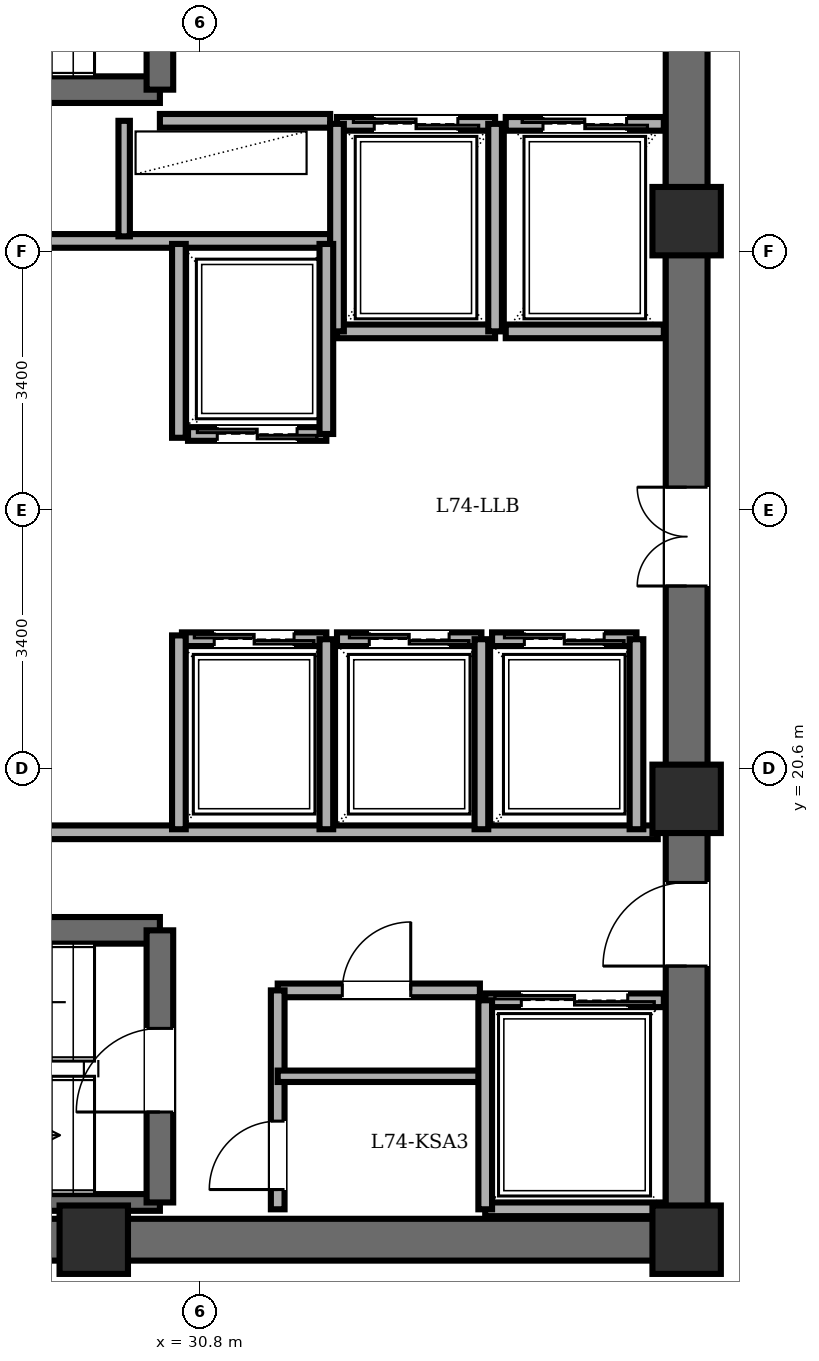
"""IFC4 building model, lengths in metres.
Left out: names, types, materials, properties, quantities, classifications, styles, units other than length and angle.
Written with IfcOpenShell. Run it as: python <this file> out.ifc"""

import sys

from ifc_helpers import new_model, si_unit, direction, frame, frame_2d, origin, origin_2d, place, context, subcontext, project, spatial, rectangle, extrude, element, fill, save


model = new_model("IFC4")
c1 = context("Model", 3, precision=1e-05, world=origin(), true_north=direction((0.0, 1.0)))
c2 = subcontext(c1, "Body", "Model", "MODEL_VIEW")
j1 = project(units=[si_unit("LENGTHUNIT", "METRE"), si_unit("PLANEANGLEUNIT", "RADIAN")], contexts=[c1])
p1 = place(None, origin())
s1 = spatial("IfcSite", under=j1, at=p1, CompositionType="ELEMENT")
p2 = place(p1, origin())
s2 = spatial("IfcBuilding", under=s1, at=p2, CompositionType="ELEMENT")
p3 = place(p2, frame((0.0, 0.0, 284.35)))
s3 = spatial("IfcBuildingStorey", under=s2, at=p3, CompositionType="ELEMENT", Elevation=284.35)
for number, where, z_axis, x_axis in (
    (1, (29.4, 14.4, 0.0), (0.0, 0.0, 1.0), (1.0, 0.0, 0.0)),
    (2, (37.2, 14.4, 0.0), (0.0, 0.0, 1.0), (1.0, 0.0, 0.0)),
    (3, (37.2, 20.2, 0.0), (0.0, 0.0, 1.0), (1.0, 0.0, 0.0)),
    (4, (37.2, 27.8, 0.0), (0.0, 0.0, 1.0), (1.0, 0.0, 0.0)),
):
    element("IfcColumn", number, at=place(p3, frame(where, z_axis=z_axis, x_axis=x_axis)), inside=s3, PredefinedType="COLUMN", context=c2, shape_type="SweptSolid", body=[
        extrude(rectangle(XDim=0.9, YDim=0.9, at=origin_2d()), origin(), (0.0, 0.0, 1.0), 3.65),
    ])
p4 = place(p3, frame((37.2, 14.4, 0.0), z_axis=(0.0, 0.0, 1.0), x_axis=(-1.0, 0.0, 0.0)))
e5 = element("IfcWall", 5, at=p4, inside=s3, PredefinedType="SHEAR", context=c2, shape_type="SweptSolid", body=[
    extrude(rectangle(XDim=15.6, YDim=0.55, at=frame_2d((7.8, 0.0))), origin(), (0.0, 0.0, 1.0), 3.45),
])
p5 = place(p3, frame((37.2, 14.4, 0.0), z_axis=(0.0, 0.0, 1.0), x_axis=(0.0, 1.0, 0.0)))
e6 = element("IfcWall", 6, at=p5, inside=s3, PredefinedType="SHEAR", context=c2, shape_type="SweptSolid", body=[
    extrude(rectangle(XDim=19.2, YDim=0.55, at=frame_2d((9.6, 0.0))), origin(), (0.0, 0.0, 1.0), 3.45),
])
p6 = place(p5, frame((15.8, 0.0, 0.0)))
e7 = element("IfcOpeningElement", 7, at=p6, cuts=e6, PredefinedType="OPENING", context=c2, shape_type="SweptSolid", body=[
    extrude(rectangle(XDim=1.15, YDim=2.15, at=frame_2d((0.575, 1.075))), frame((0.0, 0.285, 0.0), z_axis=(0.0, -1.0, 0.0), x_axis=(1.0, 0.0, 0.0)), (0.0, 0.0, 1.0), 0.57),
])
p7 = place(p5, frame((3.6, 0.0, 0.0)))
e8 = element("IfcOpeningElement", 8, at=p7, cuts=e6, PredefinedType="OPENING", context=c2, shape_type="SweptSolid", body=[
    extrude(rectangle(XDim=1.1, YDim=2.15, at=frame_2d((0.55, 1.075))), frame((0.0, 0.285, 0.0), z_axis=(0.0, -1.0, 0.0), x_axis=(1.0, 0.0, 0.0)), (0.0, 0.0, 1.0), 0.57),
])
p8 = place(p5, frame((8.6, 0.0, 0.0)))
e9 = element("IfcOpeningElement", 9, at=p8, cuts=e6, PredefinedType="OPENING", context=c2, shape_type="SweptSolid", body=[
    extrude(rectangle(XDim=1.3, YDim=2.2, at=frame_2d((0.65, 1.1))), frame((0.0, 0.285, 0.0), z_axis=(0.0, -1.0, 0.0), x_axis=(1.0, 0.0, 0.0)), (0.0, 0.0, 1.0), 0.57),
])
p9 = place(p3, frame((22.48, 29.53, 0.0), z_axis=(0.0, 0.0, 1.0), x_axis=(1.0, 0.0, 0.0)))
e10 = element("IfcWall", 10, at=p9, inside=s3, PredefinedType="SOLIDWALL", context=c2, shape_type="SweptSolid", body=[
    extrude(rectangle(XDim=7.79, YDim=0.35, at=frame_2d((3.895, 0.0))), origin(), (0.0, 0.0, 1.0), 3.45),
])
p10 = place(p3, frame((30.27, 29.53, 0.0), z_axis=(0.0, 0.0, 1.0), x_axis=(0.0, 1.0, 0.0)))
e11 = element("IfcWall", 11, at=p10, inside=s3, PredefinedType="SOLIDWALL", context=c2, shape_type="SweptSolid", body=[
    extrude(rectangle(XDim=3.58, YDim=0.35, at=frame_2d((1.79, 0.0))), origin(), (0.0, 0.0, 1.0), 3.45),
])
p11 = place(p10, frame((1.25, 0.0, 0.0)))
e12 = element("IfcOpeningElement", 12, at=p11, cuts=e11, PredefinedType="OPENING", context=c2, shape_type="SweptSolid", body=[
    extrude(rectangle(XDim=1.1, YDim=2.15, at=frame_2d((0.55, 1.075))), frame((0.0, 0.185, 0.0), z_axis=(0.0, -1.0, 0.0), x_axis=(1.0, 0.0, 0.0)), (0.0, 0.0, 1.0), 0.37),
])
p12 = place(p3, frame((22.48, 18.47, 0.0), z_axis=(0.0, 0.0, 1.0), x_axis=(1.0, 0.0, 0.0)))
e13 = element("IfcWall", 13, at=p12, inside=s3, PredefinedType="SOLIDWALL", context=c2, shape_type="SweptSolid", body=[
    extrude(rectangle(XDim=7.79, YDim=0.35, at=frame_2d((3.895, 0.0))), origin(), (0.0, 0.0, 1.0), 3.45),
])
p13 = place(p3, frame((22.48, 14.89, 0.0), z_axis=(0.0, 0.0, 1.0), x_axis=(1.0, 0.0, 0.0)))
e14 = element("IfcWall", 14, at=p13, inside=s3, PredefinedType="PARTITIONING", context=c2, shape_type="SweptSolid", body=[
    extrude(rectangle(XDim=7.79, YDim=0.22, at=frame_2d((3.895, 0.0))), origin(), (0.0, 0.0, 1.0), 3.45),
])
p14 = place(p3, frame((30.27, 14.89, 0.0), z_axis=(0.0, 0.0, 1.0), x_axis=(0.0, 1.0, 0.0)))
e15 = element("IfcWall", 15, at=p14, inside=s3, PredefinedType="SOLIDWALL", context=c2, shape_type="SweptSolid", body=[
    extrude(rectangle(XDim=3.58, YDim=0.35, at=frame_2d((1.79, 0.0))), origin(), (0.0, 0.0, 1.0), 3.45),
])
p15 = place(p14, frame((1.19, 0.0, 0.0)))
e16 = element("IfcOpeningElement", 16, at=p15, cuts=e15, PredefinedType="OPENING", context=c2, shape_type="SweptSolid", body=[
    extrude(rectangle(XDim=1.1, YDim=2.15, at=frame_2d((0.55, 1.075))), frame((0.0, 0.185, 0.0), z_axis=(0.0, -1.0, 0.0), x_axis=(1.0, 0.0, 0.0)), (0.0, 0.0, 1.0), 0.37),
])
p16 = place(p3, frame((30.27, 29.12, 0.0), z_axis=(0.0, 0.0, 1.0), x_axis=(1.0, 0.0, 0.0)))
e17 = element("IfcWall", 17, at=p16, inside=s3, PredefinedType="PARTITIONING", context=c2, shape_type="SweptSolid", body=[
    extrude(rectangle(XDim=2.24, YDim=0.18, at=frame_2d((1.12, 0.0))), origin(), (0.0, 0.0, 1.0), 3.45),
])
p17 = place(p3, frame((21.95, 27.54, 0.0), z_axis=(0.0, 0.0, 1.0), x_axis=(1.0, 0.0, 0.0)))
e18 = element("IfcWall", 18, at=p17, inside=s3, PredefinedType="PARTITIONING", context=c2, shape_type="SweptSolid", body=[
    extrude(rectangle(XDim=10.56, YDim=0.18, at=frame_2d((5.28, 0.0))), origin(), (0.0, 0.0, 1.0), 3.45),
])
p18 = place(p3, frame((29.8, 27.6, 0.0), z_axis=(0.0, 0.0, 1.0), x_axis=(0.0, 1.0, 0.0)))
e19 = element("IfcWall", 19, at=p18, inside=s3, PredefinedType="PARTITIONING", context=c2, shape_type="SweptSolid", body=[
    extrude(rectangle(XDim=1.52, YDim=0.15, at=frame_2d((0.76, 0.0))), origin(), (0.0, 0.0, 1.0), 3.45),
])
p19 = place(p3, frame((21.95, 19.76, 0.0), z_axis=(0.0, 0.0, 1.0), x_axis=(1.0, 0.0, 0.0)))
e20 = element("IfcWall", 20, at=p19, inside=s3, PredefinedType="PARTITIONING", context=c2, shape_type="SweptSolid", body=[
    extrude(rectangle(XDim=14.87, YDim=0.18, at=frame_2d((7.435, 0.0))), origin(), (0.0, 0.0, 1.0), 3.45),
])
p20 = place(p3, frame((31.82, 17.68, 0.0), z_axis=(0.0, 0.0, 1.0), x_axis=(1.0, 0.0, 0.0)))
e21 = element("IfcWall", 21, at=p20, inside=s3, PredefinedType="PARTITIONING", context=c2, shape_type="SweptSolid", body=[
    extrude(rectangle(XDim=2.66, YDim=0.18, at=frame_2d((1.33, 0.0))), origin(), (0.0, 0.0, 1.0), 3.45),
])
p21 = place(p20, frame((0.85, 0.0, 0.0)))
e22 = element("IfcOpeningElement", 22, at=p21, cuts=e21, PredefinedType="OPENING", context=c2, shape_type="SweptSolid", body=[
    extrude(rectangle(XDim=0.9, YDim=2.05, at=frame_2d((0.45, 1.025))), frame((0.0, 0.1, 0.0), z_axis=(0.0, -1.0, 0.0), x_axis=(1.0, 0.0, 0.0)), (0.0, 0.0, 1.0), 0.2),
])
p22 = place(p3, frame((31.82, 14.8, 0.0), z_axis=(0.0, 0.0, 1.0), x_axis=(0.0, 1.0, 0.0)))
e23 = element("IfcWall", 23, at=p22, inside=s3, PredefinedType="PARTITIONING", context=c2, shape_type="SweptSolid", body=[
    extrude(rectangle(XDim=2.88, YDim=0.18, at=frame_2d((1.44, 0.0))), origin(), (0.0, 0.0, 1.0), 3.45),
])
p23 = place(p22, frame((0.26, 0.0, 0.0)))
e24 = element("IfcOpeningElement", 24, at=p23, cuts=e23, PredefinedType="OPENING", context=c2, shape_type="SweptSolid", body=[
    extrude(rectangle(XDim=0.9, YDim=2.05, at=frame_2d((0.45, 1.025))), frame((0.0, 0.1, 0.0), z_axis=(0.0, -1.0, 0.0), x_axis=(1.0, 0.0, 0.0)), (0.0, 0.0, 1.0), 0.2),
])
p24 = place(p3, frame((31.82, 16.55, 0.0), z_axis=(0.0, 0.0, 1.0), x_axis=(1.0, 0.0, 0.0)))
e25 = element("IfcWall", 25, at=p24, inside=s3, PredefinedType="PARTITIONING", context=c2, shape_type="SweptSolid", body=[
    extrude(rectangle(XDim=2.66, YDim=0.15, at=frame_2d((1.33, 0.0))), origin(), (0.0, 0.0, 1.0), 3.45),
])
p25 = place(p3, frame((32.6, 29.08, 0.0), z_axis=(0.0, 0.0, 1.0), x_axis=(1.0, 0.0, 0.0)))
e26 = element("IfcWall", 26, at=p25, inside=s3, PredefinedType="PARTITIONING", context=c2, shape_type="SweptSolid", body=[
    extrude(rectangle(XDim=2.08, YDim=0.18, at=frame_2d((1.04, 0.0))), origin(), (0.0, 0.0, 1.0), 3.45),
])
p26 = place(p25, frame((0.49, 0.0, 0.0)))
e27 = element("IfcOpeningElement", 27, at=p26, cuts=e26, PredefinedType="OPENING", context=c2, shape_type="SweptSolid", body=[
    extrude(rectangle(XDim=1.1, YDim=2.2, at=frame_2d((0.55, 1.1))), frame((0.0, 0.1, 0.0), z_axis=(0.0, -1.0, 0.0), x_axis=(1.0, 0.0, 0.0)), (0.0, 0.0, 1.0), 0.2),
])
p27 = place(p3, frame((34.68, 26.35, 0.0), z_axis=(0.0, 0.0, 1.0), x_axis=(-1.0, 0.0, 0.0)))
e28 = element("IfcWall", 28, at=p27, inside=s3, PredefinedType="PARTITIONING", context=c2, shape_type="SweptSolid", body=[
    extrude(rectangle(XDim=2.08, YDim=0.18, at=frame_2d((1.04, 0.0))), origin(), (0.0, 0.0, 1.0), 3.45),
])
for number, where, z_axis, x_axis in (
    (29, (34.68, 26.35, 0.0), (0.0, 0.0, 1.0), (0.0, 1.0, 0.0)),
    (30, (32.6, 29.08, 0.0), (0.0, 0.0, 1.0), (0.0, -1.0, 0.0)),
):
    element("IfcWall", number, at=place(p3, frame(where, z_axis=z_axis, x_axis=x_axis)), inside=s3, PredefinedType="PARTITIONING", context=c2, shape_type="SweptSolid", body=[
        extrude(rectangle(XDim=2.73, YDim=0.18, at=frame_2d((1.365, 0.0))), origin(), (0.0, 0.0, 1.0), 3.45),
    ])
p28 = place(p3, frame((34.82, 29.08, 0.0), z_axis=(0.0, 0.0, 1.0), x_axis=(1.0, 0.0, 0.0)))
e31 = element("IfcWall", 31, at=p28, inside=s3, PredefinedType="PARTITIONING", context=c2, shape_type="SweptSolid", body=[
    extrude(rectangle(XDim=2.08, YDim=0.18, at=frame_2d((1.04, 0.0))), origin(), (0.0, 0.0, 1.0), 3.45),
])
p29 = place(p28, frame((0.49, 0.0, 0.0)))
e32 = element("IfcOpeningElement", 32, at=p29, cuts=e31, PredefinedType="OPENING", context=c2, shape_type="SweptSolid", body=[
    extrude(rectangle(XDim=1.1, YDim=2.2, at=frame_2d((0.55, 1.1))), frame((0.0, 0.1, 0.0), z_axis=(0.0, -1.0, 0.0), x_axis=(1.0, 0.0, 0.0)), (0.0, 0.0, 1.0), 0.2),
])
p30 = place(p3, frame((36.9, 26.35, 0.0), z_axis=(0.0, 0.0, 1.0), x_axis=(-1.0, 0.0, 0.0)))
e33 = element("IfcWall", 33, at=p30, inside=s3, PredefinedType="PARTITIONING", context=c2, shape_type="SweptSolid", body=[
    extrude(rectangle(XDim=2.08, YDim=0.18, at=frame_2d((1.04, 0.0))), origin(), (0.0, 0.0, 1.0), 3.45),
])
p31 = place(p3, frame((34.55, 17.55, 0.0), z_axis=(0.0, 0.0, 1.0), x_axis=(1.0, 0.0, 0.0)))
e34 = element("IfcWall", 34, at=p31, inside=s3, PredefinedType="PARTITIONING", context=c2, shape_type="SweptSolid", body=[
    extrude(rectangle(XDim=2.35, YDim=0.18, at=frame_2d((1.175, 0.0))), origin(), (0.0, 0.0, 1.0), 3.45),
])
p32 = place(p31, frame((0.475, 0.0, 0.0)))
e35 = element("IfcOpeningElement", 35, at=p32, cuts=e34, PredefinedType="OPENING", context=c2, shape_type="SweptSolid", body=[
    extrude(rectangle(XDim=1.4, YDim=2.3, at=frame_2d((0.7, 1.15))), frame((0.0, 0.1, 0.0), z_axis=(0.0, -1.0, 0.0), x_axis=(1.0, 0.0, 0.0)), (0.0, 0.0, 1.0), 0.2),
])
p33 = place(p3, frame((36.9, 14.8, 0.0), z_axis=(0.0, 0.0, 1.0), x_axis=(-1.0, 0.0, 0.0)))
e36 = element("IfcWall", 36, at=p33, inside=s3, PredefinedType="PARTITIONING", context=c2, shape_type="SweptSolid", body=[
    extrude(rectangle(XDim=2.35, YDim=0.18, at=frame_2d((1.175, 0.0))), origin(), (0.0, 0.0, 1.0), 3.45),
])
p34 = place(p3, frame((34.55, 17.55, 0.0), z_axis=(0.0, 0.0, 1.0), x_axis=(0.0, -1.0, 0.0)))
e37 = element("IfcWall", 37, at=p34, inside=s3, PredefinedType="PARTITIONING", context=c2, shape_type="SweptSolid", body=[
    extrude(rectangle(XDim=2.75, YDim=0.18, at=frame_2d((1.375, 0.0))), origin(), (0.0, 0.0, 1.0), 3.45),
])
p35 = place(p3, frame((32.46, 25.0, 0.0), z_axis=(0.0, 0.0, 1.0), x_axis=(-1.0, 0.0, 0.0)))
e38 = element("IfcWall", 38, at=p35, inside=s3, PredefinedType="PARTITIONING", context=c2, shape_type="SweptSolid", body=[
    extrude(rectangle(XDim=1.82, YDim=0.18, at=frame_2d((0.91, 0.0))), origin(), (0.0, 0.0, 1.0), 3.45),
])
p36 = place(p35, frame((0.385, 0.0, 0.0)))
e39 = element("IfcOpeningElement", 39, at=p36, cuts=e38, PredefinedType="OPENING", context=c2, shape_type="SweptSolid", body=[
    extrude(rectangle(XDim=1.05, YDim=2.2, at=frame_2d((0.525, 1.1))), frame((0.0, 0.1, 0.0), z_axis=(0.0, -1.0, 0.0), x_axis=(1.0, 0.0, 0.0)), (0.0, 0.0, 1.0), 0.2),
])
p37 = place(p3, frame((32.46, 25.0, 0.0), z_axis=(0.0, 0.0, 1.0), x_axis=(0.0, 1.0, 0.0)))
e40 = element("IfcWall", 40, at=p37, inside=s3, PredefinedType="PARTITIONING", context=c2, shape_type="SweptSolid", body=[
    extrude(rectangle(XDim=2.5, YDim=0.18, at=frame_2d((1.25, 0.0))), origin(), (0.0, 0.0, 1.0), 3.45),
])
p38 = place(p3, frame((30.56, 22.3, 0.0), z_axis=(0.0, 0.0, 1.0), x_axis=(1.0, 0.0, 0.0)))
e41 = element("IfcWall", 41, at=p38, inside=s3, PredefinedType="PARTITIONING", context=c2, shape_type="SweptSolid", body=[
    extrude(rectangle(XDim=1.9, YDim=0.18, at=frame_2d((0.95, 0.0))), origin(), (0.0, 0.0, 1.0), 3.45),
])
p39 = place(p38, frame((0.425, 0.0, 0.0)))
e42 = element("IfcOpeningElement", 42, at=p39, cuts=e41, PredefinedType="OPENING", context=c2, shape_type="SweptSolid", body=[
    extrude(rectangle(XDim=1.05, YDim=2.2, at=frame_2d((0.525, 1.1))), frame((0.0, 0.1, 0.0), z_axis=(0.0, -1.0, 0.0), x_axis=(1.0, 0.0, 0.0)), (0.0, 0.0, 1.0), 0.2),
])
p40 = place(p3, frame((32.46, 19.8, 0.0), z_axis=(0.0, 0.0, 1.0), x_axis=(0.0, 1.0, 0.0)))
e43 = element("IfcWall", 43, at=p40, inside=s3, PredefinedType="PARTITIONING", context=c2, shape_type="SweptSolid", body=[
    extrude(rectangle(XDim=2.5, YDim=0.18, at=frame_2d((1.25, 0.0))), origin(), (0.0, 0.0, 1.0), 3.45),
])
p41 = place(p3, frame((32.6, 22.3, 0.0), z_axis=(0.0, 0.0, 1.0), x_axis=(1.0, 0.0, 0.0)))
e44 = element("IfcWall", 44, at=p41, inside=s3, PredefinedType="PARTITIONING", context=c2, shape_type="SweptSolid", body=[
    extrude(rectangle(XDim=1.9, YDim=0.18, at=frame_2d((0.95, 0.0))), origin(), (0.0, 0.0, 1.0), 3.45),
])
p42 = place(p41, frame((0.425, 0.0, 0.0)))
e45 = element("IfcOpeningElement", 45, at=p42, cuts=e44, PredefinedType="OPENING", context=c2, shape_type="SweptSolid", body=[
    extrude(rectangle(XDim=1.05, YDim=2.2, at=frame_2d((0.525, 1.1))), frame((0.0, 0.1, 0.0), z_axis=(0.0, -1.0, 0.0), x_axis=(1.0, 0.0, 0.0)), (0.0, 0.0, 1.0), 0.2),
])
p43 = place(p3, frame((34.5, 19.8, 0.0), z_axis=(0.0, 0.0, 1.0), x_axis=(0.0, 1.0, 0.0)))
e46 = element("IfcWall", 46, at=p43, inside=s3, PredefinedType="PARTITIONING", context=c2, shape_type="SweptSolid", body=[
    extrude(rectangle(XDim=2.5, YDim=0.18, at=frame_2d((1.25, 0.0))), origin(), (0.0, 0.0, 1.0), 3.45),
])
p44 = place(p3, frame((34.64, 22.3, 0.0), z_axis=(0.0, 0.0, 1.0), x_axis=(1.0, 0.0, 0.0)))
e47 = element("IfcWall", 47, at=p44, inside=s3, PredefinedType="PARTITIONING", context=c2, shape_type="SweptSolid", body=[
    extrude(rectangle(XDim=1.9, YDim=0.18, at=frame_2d((0.95, 0.0))), origin(), (0.0, 0.0, 1.0), 3.45),
])
p45 = place(p44, frame((0.425, 0.0, 0.0)))
e48 = element("IfcOpeningElement", 48, at=p45, cuts=e47, PredefinedType="OPENING", context=c2, shape_type="SweptSolid", body=[
    extrude(rectangle(XDim=1.05, YDim=2.2, at=frame_2d((0.525, 1.1))), frame((0.0, 0.1, 0.0), z_axis=(0.0, -1.0, 0.0), x_axis=(1.0, 0.0, 0.0)), (0.0, 0.0, 1.0), 0.2),
])
p46 = place(p3, frame((36.54, 19.8, 0.0), z_axis=(0.0, 0.0, 1.0), x_axis=(0.0, 1.0, 0.0)))
e49 = element("IfcWall", 49, at=p46, inside=s3, PredefinedType="PARTITIONING", context=c2, shape_type="SweptSolid", body=[
    extrude(rectangle(XDim=2.5, YDim=0.18, at=frame_2d((1.25, 0.0))), origin(), (0.0, 0.0, 1.0), 3.45),
])
for number, where, z_axis, x_axis in (
    (50, (30.52, 24.95, 0.0), (0.0, 0.0, 1.0), (0.0, 1.0, 0.0)),
    (51, (30.52, 19.8, 0.0), (0.0, 0.0, 1.0), (0.0, 1.0, 0.0)),
):
    element("IfcWall", number, at=place(p3, frame(where, z_axis=z_axis, x_axis=x_axis)), inside=s3, PredefinedType="PARTITIONING", context=c2, shape_type="SweptSolid", body=[
        extrude(rectangle(XDim=2.55, YDim=0.18, at=frame_2d((1.275, 0.0))), origin(), (0.0, 0.0, 1.0), 3.45),
    ])
p47 = place(p15, origin())
e52 = element("IfcDoor", 52, at=p47, inside=s3, OperationType="SINGLE_SWING_LEFT", PredefinedType="DOOR", context=c2, shape_type="SweptSolid", body=[
    extrude(rectangle(XDim=1.1, YDim=2.15, at=frame_2d((0.55, 1.075))), frame((0.0, 0.025, 0.0), z_axis=(0.0, -1.0, 0.0), x_axis=(1.0, 0.0, 0.0)), (0.0, 0.0, 1.0), 0.05),
])
fill(e16, e52)
p48 = place(p7, origin())
e53 = element("IfcDoor", 53, at=p48, inside=s3, OperationType="SINGLE_SWING_LEFT", PredefinedType="DOOR", context=c2, shape_type="SweptSolid", body=[
    extrude(rectangle(XDim=1.1, YDim=2.15, at=frame_2d((0.55, 1.075))), frame((0.0, 0.025, 0.0), z_axis=(0.0, -1.0, 0.0), x_axis=(1.0, 0.0, 0.0)), (0.0, 0.0, 1.0), 0.05),
])
fill(e8, e53)
p49 = place(p21, origin())
e54 = element("IfcDoor", 54, at=p49, inside=s3, OperationType="SINGLE_SWING_RIGHT", PredefinedType="DOOR", context=c2, shape_type="SweptSolid", body=[
    extrude(rectangle(XDim=0.9, YDim=2.05, at=frame_2d((0.45, 1.025))), frame((0.0, 0.025, 0.0), z_axis=(0.0, -1.0, 0.0), x_axis=(1.0, 0.0, 0.0)), (0.0, 0.0, 1.0), 0.05),
])
fill(e22, e54)
p50 = place(p23, origin())
e55 = element("IfcDoor", 55, at=p50, inside=s3, OperationType="SINGLE_SWING_LEFT", PredefinedType="DOOR", context=c2, shape_type="SweptSolid", body=[
    extrude(rectangle(XDim=0.9, YDim=2.05, at=frame_2d((0.45, 1.025))), frame((0.0, 0.025, 0.0), z_axis=(0.0, -1.0, 0.0), x_axis=(1.0, 0.0, 0.0)), (0.0, 0.0, 1.0), 0.05),
])
fill(e24, e55)
p51 = place(p26, origin())
e56 = element("IfcDoor", 56, at=p51, inside=s3, OperationType="DOUBLE_DOOR_SLIDING", PredefinedType="DOOR", context=c2, shape_type="SweptSolid", body=[
    extrude(rectangle(XDim=1.1, YDim=2.2, at=frame_2d((0.55, 1.1))), frame((0.0, 0.025, 0.0), z_axis=(0.0, -1.0, 0.0), x_axis=(1.0, 0.0, 0.0)), (0.0, 0.0, 1.0), 0.05),
])
fill(e27, e56)
p52 = place(p29, origin())
e57 = element("IfcDoor", 57, at=p52, inside=s3, OperationType="DOUBLE_DOOR_SLIDING", PredefinedType="DOOR", context=c2, shape_type="SweptSolid", body=[
    extrude(rectangle(XDim=1.1, YDim=2.2, at=frame_2d((0.55, 1.1))), frame((0.0, 0.025, 0.0), z_axis=(0.0, -1.0, 0.0), x_axis=(1.0, 0.0, 0.0)), (0.0, 0.0, 1.0), 0.05),
])
fill(e32, e57)
p53 = place(p32, origin())
e58 = element("IfcDoor", 58, at=p53, inside=s3, OperationType="DOUBLE_DOOR_SLIDING", PredefinedType="DOOR", context=c2, shape_type="SweptSolid", body=[
    extrude(rectangle(XDim=1.4, YDim=2.3, at=frame_2d((0.7, 1.15))), frame((0.0, 0.025, 0.0), z_axis=(0.0, -1.0, 0.0), x_axis=(1.0, 0.0, 0.0)), (0.0, 0.0, 1.0), 0.05),
])
fill(e35, e58)
p54 = place(p36, origin())
e59 = element("IfcDoor", 59, at=p54, inside=s3, OperationType="DOUBLE_DOOR_SLIDING", PredefinedType="DOOR", context=c2, shape_type="SweptSolid", body=[
    extrude(rectangle(XDim=1.05, YDim=2.2, at=frame_2d((0.525, 1.1))), frame((0.0, 0.025, 0.0), z_axis=(0.0, -1.0, 0.0), x_axis=(1.0, 0.0, 0.0)), (0.0, 0.0, 1.0), 0.05),
])
fill(e39, e59)
p55 = place(p39, origin())
e60 = element("IfcDoor", 60, at=p55, inside=s3, OperationType="DOUBLE_DOOR_SLIDING", PredefinedType="DOOR", context=c2, shape_type="SweptSolid", body=[
    extrude(rectangle(XDim=1.05, YDim=2.2, at=frame_2d((0.525, 1.1))), frame((0.0, 0.025, 0.0), z_axis=(0.0, -1.0, 0.0), x_axis=(1.0, 0.0, 0.0)), (0.0, 0.0, 1.0), 0.05),
])
fill(e42, e60)
p56 = place(p42, origin())
e61 = element("IfcDoor", 61, at=p56, inside=s3, OperationType="DOUBLE_DOOR_SLIDING", PredefinedType="DOOR", context=c2, shape_type="SweptSolid", body=[
    extrude(rectangle(XDim=1.05, YDim=2.2, at=frame_2d((0.525, 1.1))), frame((0.0, 0.025, 0.0), z_axis=(0.0, -1.0, 0.0), x_axis=(1.0, 0.0, 0.0)), (0.0, 0.0, 1.0), 0.05),
])
fill(e45, e61)
p57 = place(p45, origin())
e62 = element("IfcDoor", 62, at=p57, inside=s3, OperationType="DOUBLE_DOOR_SLIDING", PredefinedType="DOOR", context=c2, shape_type="SweptSolid", body=[
    extrude(rectangle(XDim=1.05, YDim=2.2, at=frame_2d((0.525, 1.1))), frame((0.0, 0.025, 0.0), z_axis=(0.0, -1.0, 0.0), x_axis=(1.0, 0.0, 0.0)), (0.0, 0.0, 1.0), 0.05),
])
fill(e48, e62)
p58 = place(p8, origin())
e63 = element("IfcDoor", 63, at=p58, inside=s3, OperationType="DOUBLE_DOOR_SINGLE_SWING", PredefinedType="DOOR", context=c2, shape_type="SweptSolid", body=[
    extrude(rectangle(XDim=1.3, YDim=2.2, at=frame_2d((0.65, 1.1))), frame((0.0, 0.025, 0.0), z_axis=(0.0, -1.0, 0.0), x_axis=(1.0, 0.0, 0.0)), (0.0, 0.0, 1.0), 0.05),
])
fill(e9, e63)
save(model, sys.argv[1])
